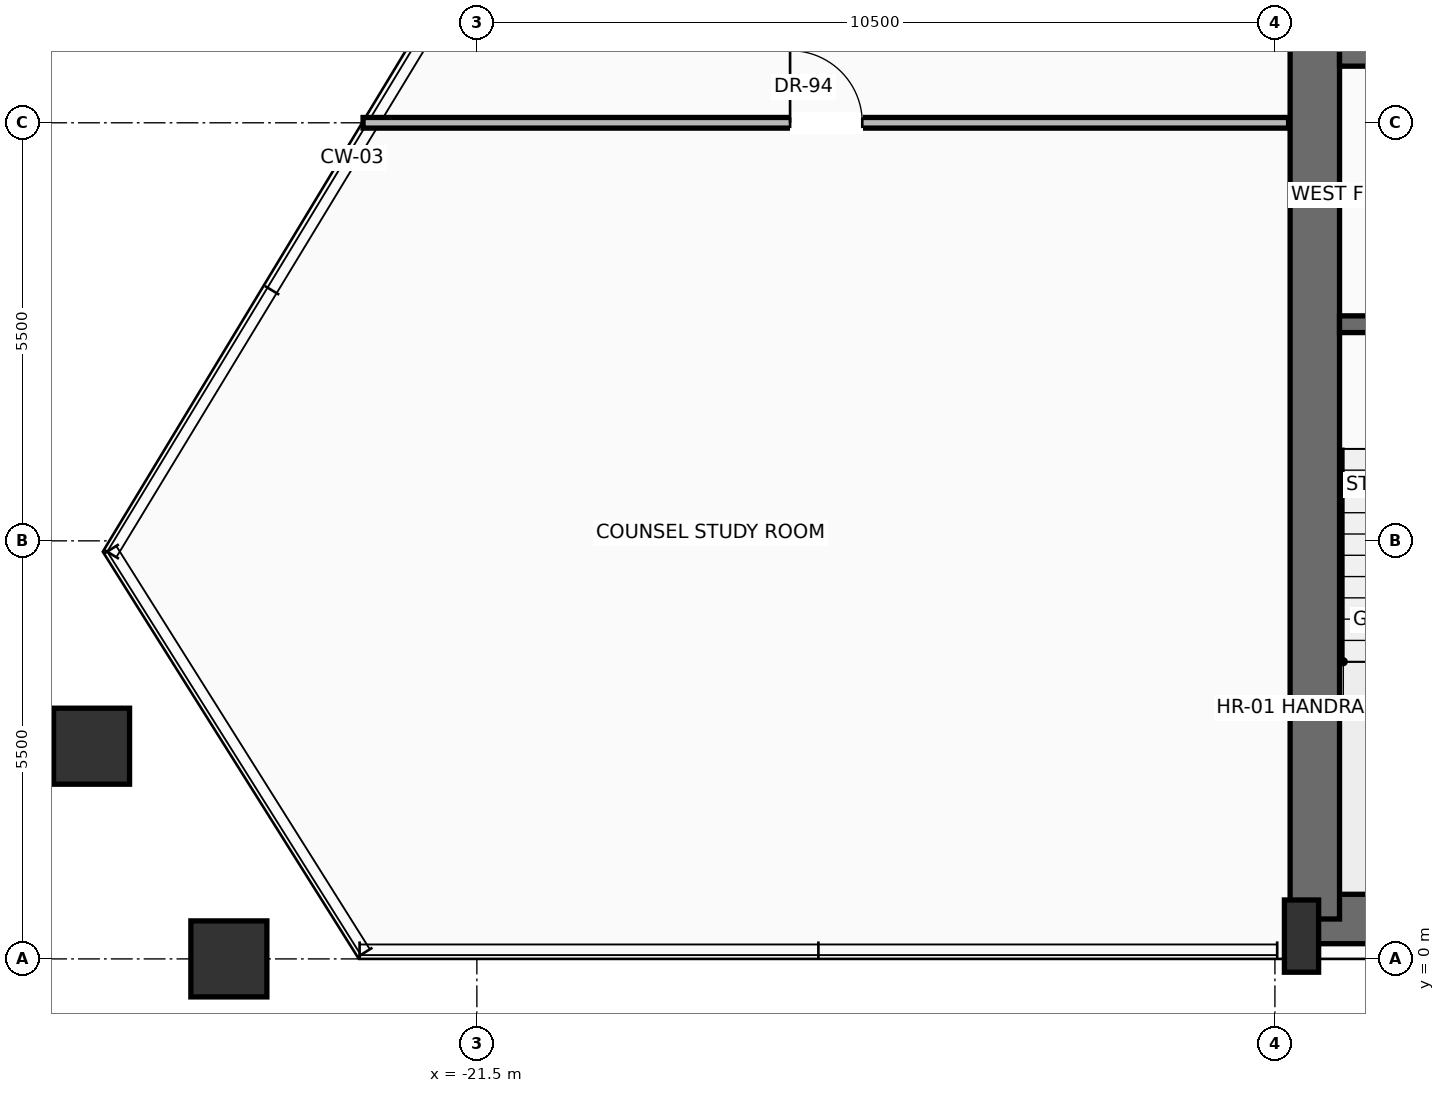
"""IFC4 building model, lengths in metres.
Left out: names, types, materials, properties, quantities, classifications, styles, units other than length and angle.
Written with IfcOpenShell. Run it as: python <this file> out.ifc"""

import sys

from ifc_helpers import new_model, si_unit, direction, frame, frame_2d, origin, origin_2d, place, context, subcontext, project, spatial, rectangle, hollow_rectangle, extrude, source, transform, mapped, element, fill, save


model = new_model("IFC4")
c1 = context("Model", 3, precision=1e-05, world=origin(), true_north=direction((0.0, 1.0)))
c2 = subcontext(c1, "Body", "Model", "MODEL_VIEW")
j1 = project(units=[si_unit("LENGTHUNIT", "METRE"), si_unit("PLANEANGLEUNIT", "RADIAN")], contexts=[c1])
p1 = place(None, origin())
s1 = spatial("IfcSite", under=j1, at=p1, CompositionType="ELEMENT")
p2 = place(p1, origin())
s2 = spatial("IfcBuilding", under=s1, at=p2, CompositionType="ELEMENT")
p3 = place(p2, frame((0.0, 0.0, 211.7)))
s3 = spatial("IfcBuildingStorey", under=s2, at=p3, CompositionType="ELEMENT", Elevation=211.7)
p4 = place(p3, frame((-10.65, 0.525, 0.0), z_axis=(0.0, 0.0, 1.0), x_axis=(1.0, 0.0, 0.0)))
e1 = element("IfcWall", 1, at=p4, inside=s3, PredefinedType="SHEAR", context=c2, shape_type="SweptSolid", body=[
    extrude(rectangle(XDim=21.3, YDim=0.65, at=frame_2d((10.65, 0.0))), origin(), (0.0, 0.0, 1.0), 3.42),
])
p5 = place(p3, frame((-10.475, 0.525, 0.0), z_axis=(0.0, 0.0, 1.0), x_axis=(0.0, 1.0, 0.0)))
e2 = element("IfcWall", 2, at=p5, inside=s3, PredefinedType="SHEAR", context=c2, shape_type="SweptSolid", body=[
    extrude(rectangle(XDim=15.55, YDim=0.65, at=frame_2d((7.775, 0.0))), origin(), (0.0, 0.0, 1.0), 3.42),
])
m1 = source(origin(), c2, "Body", "SweptSolid", [
    extrude(rectangle(XDim=0.45, YDim=0.95, at=origin_2d()), origin(), (0.0, 0.0, 1.0), 3.7),
])
p6 = place(p3, frame((-10.65, 0.3, 0.0), z_axis=(0.0, 0.0, 1.0), x_axis=(1.0, 0.0, 0.0)))
e3 = element("IfcColumn", 3, at=p6, inside=s3, PredefinedType="PILASTER", context=c2, shape_type="MappedRepresentation", body=[
    mapped(m1, transform((0.0, 0.0, 0.0), scale=1.0)),
])
m2 = source(origin(), c2, "Body", "SweptSolid", [
    extrude(hollow_rectangle(XDim=1.0, YDim=1.0, WallThickness=0.05, at=origin_2d()), origin(), (0.0, 0.0, 1.0), 3.691),
])
p7 = place(p3, frame((-24.763, 0.0, 0.004), z_axis=(-0.006018807573, 0.0, 0.999981886814), x_axis=(0.0, -1.0, 0.0)))
e4 = element("IfcColumn", 4, at=p7, inside=s3, PredefinedType="COLUMN", context=c2, shape_type="MappedRepresentation", body=[
    mapped(m2, transform((0.0, 0.0, 0.0), scale=1.0)),
])
m3 = source(origin(), c2, "Body", "SweptSolid", [
    extrude(hollow_rectangle(XDim=1.0, YDim=1.0, WallThickness=0.05, at=origin_2d()), origin(), (0.0, 0.0, 1.0), 3.692),
])
p8 = place(p3, frame((-26.57, 2.798, 0.004), z_axis=(0.006282358654, -0.017855124594, 0.9998208472), x_axis=(0.943312390837, 0.331906211591, 0.0)))
e5 = element("IfcColumn", 5, at=p8, inside=s3, PredefinedType="COLUMN", context=c2, shape_type="MappedRepresentation", body=[
    mapped(m3, transform((0.0, 0.0, 0.0), scale=1.0)),
])
p9 = place(p3, frame((-5.5, 8.35, 0.0), z_axis=(0.0, 0.0, 1.0), x_axis=(-1.0, 0.0, 0.0)))
e6 = element("IfcWall", 6, at=p9, inside=s3, PredefinedType="SOLIDWALL", context=c2, shape_type="SweptSolid", body=[
    extrude(rectangle(XDim=4.65, YDim=0.22, at=frame_2d((2.325, 0.0))), origin(), (0.0, 0.0, 1.0), 3.42),
])
p10 = place(p9, frame((2.5, 0.0, 0.0)))
e7 = element("IfcOpeningElement", 7, at=p10, cuts=e6, PredefinedType="OPENING", context=c2, shape_type="SweptSolid", body=[
    extrude(rectangle(XDim=1.15, YDim=2.2, at=frame_2d((0.575, 1.1))), frame((0.0, 0.12, 0.0), z_axis=(0.0, -1.0, 0.0), x_axis=(1.0, 0.0, 0.0)), (0.0, 0.0, 1.0), 0.24),
])
p11 = place(p3, frame((-5.5, 11.87, 0.0), z_axis=(0.0, 0.0, 1.0), x_axis=(-1.0, 0.0, 0.0)))
e8 = element("IfcWall", 8, at=p11, inside=s3, PredefinedType="SOLIDWALL", context=c2, shape_type="SweptSolid", body=[
    extrude(rectangle(XDim=4.65, YDim=0.25, at=frame_2d((2.325, 0.0))), origin(), (0.0, 0.0, 1.0), 3.42),
])
p12 = place(p11, frame((2.95, 0.0, 0.0)))
e9 = element("IfcOpeningElement", 9, at=p12, cuts=e8, PredefinedType="OPENING", context=c2, shape_type="SweptSolid", body=[
    extrude(rectangle(XDim=1.2, YDim=2.25, at=frame_2d((0.6, 1.125))), frame((0.0, 0.135, 0.0), z_axis=(0.0, -1.0, 0.0), x_axis=(1.0, 0.0, 0.0)), (0.0, 0.0, 1.0), 0.27),
])
p13 = place(p3, frame((-22.997, 11.0, 0.0), z_axis=(0.0, 0.0, 1.0), x_axis=(1.0, 0.0, 0.0)))
e10 = element("IfcWall", 10, at=p13, inside=s3, PredefinedType="PARTITIONING", context=c2, shape_type="SweptSolid", body=[
    extrude(rectangle(XDim=12.177, YDim=0.14, at=frame_2d((6.089, 0.0))), origin(), (0.0, 0.0, 1.0), 3.412),
])
p14 = place(p13, frame((5.618, 0.0, 0.0)))
e11 = element("IfcOpeningElement", 11, at=p14, cuts=e10, PredefinedType="OPENING", context=c2, shape_type="SweptSolid", body=[
    extrude(rectangle(XDim=0.95, YDim=2.2, at=frame_2d((0.475, 1.1))), frame((0.0, 0.08, 0.0), z_axis=(0.0, -1.0, 0.0), x_axis=(1.0, 0.0, 0.0)), (0.0, 0.0, 1.0), 0.16),
])
m4 = source(origin(), c2, "Body", "SweptSolid", [
    extrude(rectangle(XDim=0.95, YDim=2.2, at=frame_2d((0.475, 1.1))), frame((0.0, 0.025, 0.0), z_axis=(0.0, -1.0, 0.0), x_axis=(1.0, 0.0, 0.0)), (0.0, 0.0, 1.0), 0.05),
])
p15 = place(p14, origin())
e12 = element("IfcDoor", 12, at=p15, inside=s3, OperationType="SINGLE_SWING_LEFT", PredefinedType="DOOR", context=c2, shape_type="MappedRepresentation", body=[
    mapped(m4, transform((0.0, 0.0, 0.0), scale=1.0)),
])
fill(e11, e12)
save(model, sys.argv[1])
